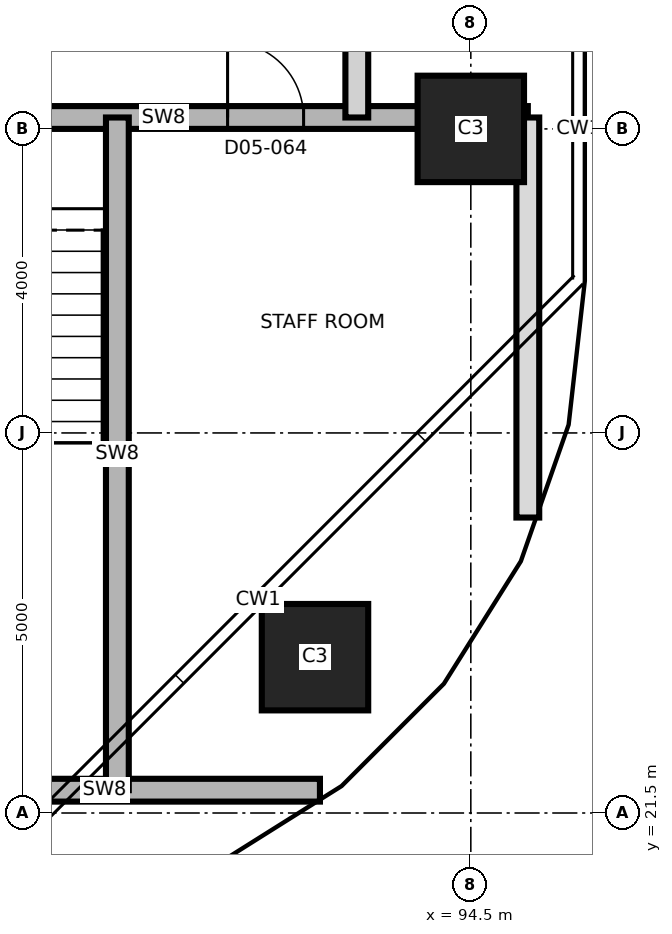
"""IFC4 building model, lengths in metres.
Left out: names, types, materials, properties, quantities, classifications, styles, units other than length and angle.
Written with IfcOpenShell. Run it as: python <this file> out.ifc"""

import sys

from ifc_helpers import new_model, si_unit, direction, frame, frame_2d, origin, origin_2d, place, context, subcontext, project, spatial, rectangle, extrude, element, fill, save


model = new_model("IFC4")
c1 = context("Model", 3, precision=1e-05, world=origin(), true_north=direction((0.0, 1.0)))
c2 = subcontext(c1, "Body", "Model", "MODEL_VIEW")
j1 = project(units=[si_unit("LENGTHUNIT", "METRE"), si_unit("PLANEANGLEUNIT", "RADIAN")], contexts=[c1])
p1 = place(None, origin())
s1 = spatial("IfcSite", under=j1, at=p1, CompositionType="ELEMENT")
p2 = place(p1, origin())
s2 = spatial("IfcBuilding", under=s1, at=p2, CompositionType="ELEMENT")
p3 = place(p2, frame((0.0, 0.0, 77.9)))
s3 = spatial("IfcBuildingStorey", under=s2, at=p3, CompositionType="ELEMENT", Elevation=77.9)
for number, where, z_axis, x_axis in (
    (1, (92.45, 23.55, 0.0), (0.0, 0.0, 1.0), (1.0, 0.0, 0.0)),
    (2, (94.5, 30.5, 0.0), (0.0, 0.0, 1.0), (1.0, 0.0, 0.0)),
):
    element("IfcColumn", number, at=place(p3, frame(where, z_axis=z_axis, x_axis=x_axis)), inside=s3, PredefinedType="COLUMN", context=c2, shape_type="SweptSolid", body=[
        extrude(rectangle(XDim=1.4, YDim=1.4, at=origin_2d()), origin(), (0.0, 0.0, 1.0), 3.7),
    ])
p4 = place(p3, frame((86.85, 21.8, 0.0), z_axis=(0.0, 0.0, 1.0), x_axis=(1.0, 0.0, 0.0)))
e3 = element("IfcWall", 3, at=p4, inside=s3, PredefinedType="SHEAR", context=c2, shape_type="SweptSolid", body=[
    extrude(rectangle(XDim=5.665, YDim=0.3, at=frame_2d((2.833, 0.0))), origin(), (0.0, 0.0, 1.0), 3.4),
])
p5 = place(p3, frame((85.67, 30.65, 0.0), z_axis=(0.0, 0.0, 1.0), x_axis=(1.0, 0.0, 0.0)))
e4 = element("IfcWall", 4, at=p5, inside=s3, PredefinedType="SHEAR", context=c2, shape_type="SweptSolid", body=[
    extrude(rectangle(XDim=9.58, YDim=0.3, at=frame_2d((4.79, 0.0))), origin(), (0.0, 0.0, 1.0), 3.4),
])
p6 = place(p5, frame((2.08, 0.0, 0.0)))
e5 = element("IfcOpeningElement", 5, at=p6, cuts=e4, PredefinedType="OPENING", context=c2, shape_type="SweptSolid", body=[
    extrude(rectangle(XDim=1.2, YDim=2.1, at=frame_2d((0.6, 1.05))), frame((0.0, 0.16, 0.0), z_axis=(0.0, -1.0, 0.0), x_axis=(1.0, 0.0, 0.0)), (0.0, 0.0, 1.0), 0.32),
])
p7 = place(p5, frame((5.63, 0.0, 0.0)))
e6 = element("IfcOpeningElement", 6, at=p7, cuts=e4, PredefinedType="OPENING", context=c2, shape_type="SweptSolid", body=[
    extrude(rectangle(XDim=1.0, YDim=2.1, at=frame_2d((0.5, 1.05))), frame((0.0, 0.16, 0.0), z_axis=(0.0, -1.0, 0.0), x_axis=(1.0, 0.0, 0.0)), (0.0, 0.0, 1.0), 0.32),
])
p8 = place(p3, frame((89.85, 21.8, 0.0), z_axis=(0.0, 0.0, 1.0), x_axis=(0.0, 1.0, 0.0)))
e7 = element("IfcWall", 7, at=p8, inside=s3, PredefinedType="SHEAR", context=c2, shape_type="SweptSolid", body=[
    extrude(rectangle(XDim=8.85, YDim=0.3, at=frame_2d((4.425, 0.0))), origin(), (0.0, 0.0, 1.0), 3.4),
])
p9 = place(p3, frame((93.0, 30.65, 0.0), z_axis=(0.0, 0.0, 1.0), x_axis=(0.0, 1.0, 0.0)))
e8 = element("IfcWall", 8, at=p9, inside=s3, PredefinedType="PARTITIONING", context=c2, shape_type="SweptSolid", body=[
    extrude(rectangle(XDim=2.7, YDim=0.3, at=frame_2d((1.35, 0.0))), origin(), (0.0, 0.0, 1.0), 3.4),
])
p10 = place(p3, frame((95.25, 25.387, 0.0), z_axis=(0.0, 0.0, 1.0), x_axis=(0.0, 1.0, 0.0)))
e9 = element("IfcWall", 9, at=p10, inside=s3, PredefinedType="PARTITIONING", context=c2, shape_type="SweptSolid", body=[
    extrude(rectangle(XDim=5.263, YDim=0.3, at=frame_2d((2.631, 0.0))), origin(), (0.0, 0.0, 1.0), 3.4),
])
p11 = place(p7, origin())
e10 = element("IfcDoor", 10, at=p11, inside=s3, OperationType="SINGLE_SWING_LEFT", PredefinedType="DOOR", context=c2, shape_type="SweptSolid", body=[
    extrude(rectangle(XDim=1.0, YDim=2.1, at=frame_2d((0.5, 1.05))), frame((0.0, 0.025, 0.0), z_axis=(0.0, -1.0, 0.0), x_axis=(1.0, 0.0, 0.0)), (0.0, 0.0, 1.0), 0.05),
])
fill(e6, e10)
save(model, sys.argv[1])
